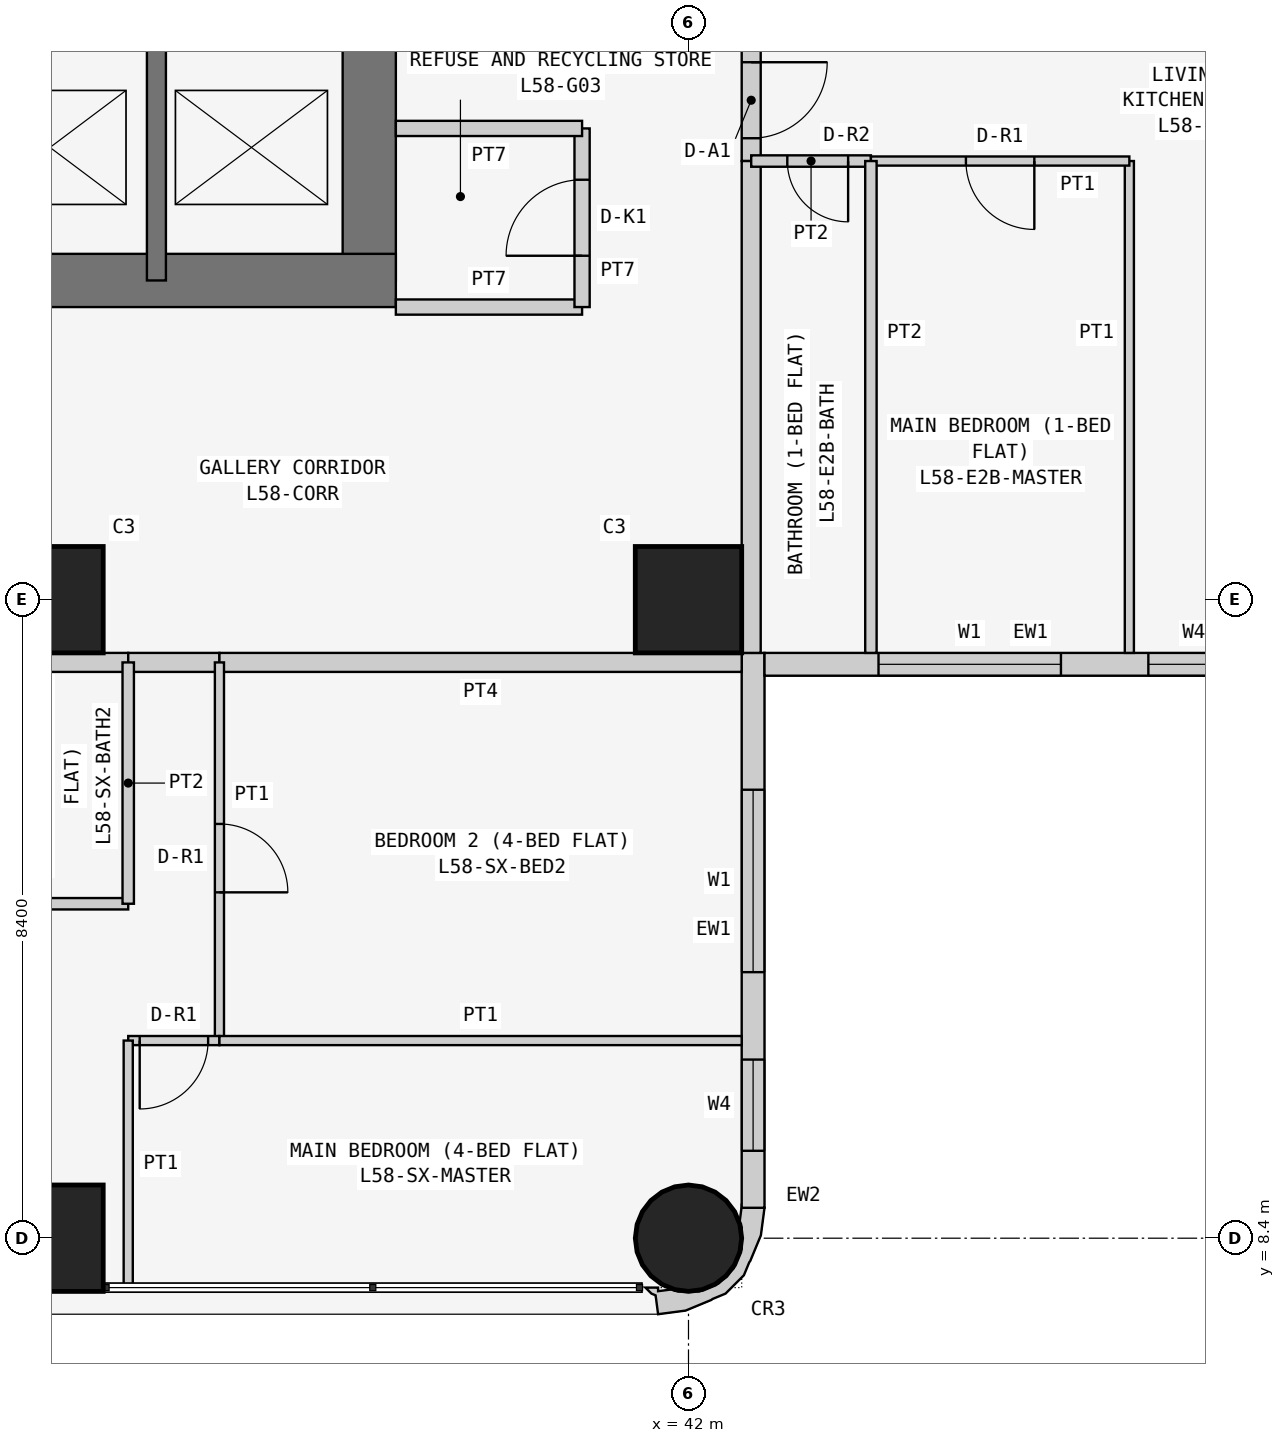
"""IFC4 building model, lengths in metres.
Left out: names, types, materials, properties, quantities, classifications, styles, units other than length and angle.
Written with IfcOpenShell. Run it as: python <this file> out.ifc"""

import sys

from ifc_helpers import new_model, si_unit, direction, frame, frame_2d, origin, origin_2d, place, context, subcontext, project, spatial, polyline, rectangle, circle, outline, extrude, element, fill, save


model = new_model("IFC4")
c1 = context("Model", 3, precision=1e-05, world=origin(), true_north=direction((0.0, 1.0)))
c2 = subcontext(c1, "Body", "Model", "MODEL_VIEW")
j1 = project(units=[si_unit("LENGTHUNIT", "METRE"), si_unit("PLANEANGLEUNIT", "RADIAN")], contexts=[c1])
p1 = place(None, origin())
s1 = spatial("IfcSite", under=j1, at=p1, CompositionType="ELEMENT")
p2 = place(p1, origin())
s2 = spatial("IfcBuilding", under=s1, at=p2, CompositionType="ELEMENT")
p3 = place(p2, frame((0.0, 0.0, 222.9)))
s3 = spatial("IfcBuildingStorey", under=s2, at=p3, CompositionType="ELEMENT", Elevation=222.9)
for number, where, z_axis, x_axis in (
    (1, (33.6, 8.4, 0.0), (0.0, 0.0, 1.0), (1.0, 0.0, 0.0)),
    (2, (33.6, 16.8, 0.0), (0.0, 0.0, 1.0), (1.0, 0.0, 0.0)),
):
    element("IfcColumn", number, at=place(p3, frame(where, z_axis=z_axis, x_axis=x_axis)), inside=s3, PredefinedType="COLUMN", context=c2, shape_type="SweptSolid", body=[
        extrude(rectangle(XDim=1.4, YDim=1.4, at=origin_2d()), origin(), (0.0, 0.0, 1.0), 3.6),
    ])
p4 = place(p3, frame((42.0, 8.4, 0.0), z_axis=(0.0, 0.0, 1.0), x_axis=(1.0, 0.0, 0.0)))
e3 = element("IfcColumn", 3, at=p4, inside=s3, PredefinedType="COLUMN", context=c2, shape_type="SweptSolid", body=[
    extrude(circle(Radius=0.7, at=origin_2d()), origin(), (0.0, 0.0, 1.0), 3.6),
])
p5 = place(p3, frame((42.0, 16.8, 0.0), z_axis=(0.0, 0.0, 1.0), x_axis=(1.0, 0.0, 0.0)))
e4 = element("IfcColumn", 4, at=p5, inside=s3, PredefinedType="COLUMN", context=c2, shape_type="SweptSolid", body=[
    extrude(rectangle(XDim=1.4, YDim=1.4, at=origin_2d()), origin(), (0.0, 0.0, 1.0), 3.6),
])
p6 = place(p3, frame((21.0, 21.0, 0.0), z_axis=(0.0, 0.0, 1.0), x_axis=(1.0, 0.0, 0.0)))
e5 = element("IfcWall", 5, at=p6, inside=s3, PredefinedType="SHEAR", context=c2, shape_type="SweptSolid", body=[
    extrude(rectangle(XDim=17.15, YDim=0.7, at=frame_2d((8.575, 0.0))), origin(), (0.0, 0.0, 1.0), 3.6),
])
p7 = place(p3, frame((37.8, 21.0, 0.0), z_axis=(0.0, 0.0, 1.0), x_axis=(0.0, 1.0, 0.0)))
e6 = element("IfcWall", 6, at=p7, inside=s3, PredefinedType="SHEAR", context=c2, shape_type="SweptSolid", body=[
    extrude(rectangle(XDim=17.15, YDim=0.7, at=frame_2d((8.575, 0.0))), origin(), (0.0, 0.0, 1.0), 3.6),
])
p8 = place(p7, frame((5.2, 0.0, 0.0)))
e7 = element("IfcOpeningElement", 7, at=p8, cuts=e6, PredefinedType="OPENING", context=c2, shape_type="SweptSolid", body=[
    extrude(rectangle(XDim=1.2, YDim=2.1, at=frame_2d((0.6, 1.05))), frame((0.0, 0.36, 0.0), z_axis=(0.0, -1.0, 0.0), x_axis=(1.0, 0.0, 0.0)), (0.0, 0.0, 1.0), 0.72),
])
p9 = place(p3, frame((35.0, 21.0, 0.0), z_axis=(0.0, 0.0, 1.0), x_axis=(0.0, 1.0, 0.0)))
e8 = element("IfcWall", 8, at=p9, inside=s3, PredefinedType="SHEAR", context=c2, shape_type="SweptSolid", body=[
    extrude(rectangle(XDim=3.2, YDim=0.25, at=frame_2d((1.6, 0.0))), origin(), (0.0, 0.0, 1.0), 3.6),
])
p10 = place(p3, frame((42.85, 8.8, 0.0), z_axis=(0.0, 0.0, 1.0), x_axis=(0.0, 1.0, 0.0)))
e9 = element("IfcWall", 9, at=p10, inside=s3, PredefinedType="SOLIDWALL", context=c2, shape_type="SweptSolid", body=[
    extrude(rectangle(XDim=7.3, YDim=0.3, at=frame_2d((3.65, 0.0))), origin(), (0.0, 0.0, 1.0), 3.45),
])
p11 = place(p10, frame((3.1, 0.0, 0.9)))
e10 = element("IfcOpeningElement", 10, at=p11, cuts=e9, PredefinedType="OPENING", context=c2, shape_type="SweptSolid", body=[
    extrude(rectangle(XDim=2.4, YDim=1.5, at=frame_2d((1.2, 0.75))), frame((0.0, 0.16, 0.0), z_axis=(0.0, -1.0, 0.0), x_axis=(1.0, 0.0, 0.0)), (0.0, 0.0, 1.0), 0.32),
])
p12 = place(p10, frame((0.75, 0.0, 0.9)))
e11 = element("IfcOpeningElement", 11, at=p12, cuts=e9, PredefinedType="OPENING", context=c2, shape_type="SweptSolid", body=[
    extrude(rectangle(XDim=1.2, YDim=1.5, at=frame_2d((0.6, 0.75))), frame((0.0, 0.16, 0.0), z_axis=(0.0, -1.0, 0.0), x_axis=(1.0, 0.0, 0.0)), (0.0, 0.0, 1.0), 0.32),
])
p13 = place(p3, frame((43.0, 15.95, 0.0), z_axis=(0.0, 0.0, 1.0), x_axis=(1.0, 0.0, 0.0)))
e12 = element("IfcWall", 12, at=p13, inside=s3, PredefinedType="SOLIDWALL", context=c2, shape_type="SweptSolid", body=[
    extrude(rectangle(XDim=7.0, YDim=0.3, at=frame_2d((3.5, 0.0))), origin(), (0.0, 0.0, 1.0), 3.45),
])
p14 = place(p13, frame((1.5, 0.0, 0.9)))
e13 = element("IfcOpeningElement", 13, at=p14, cuts=e12, PredefinedType="OPENING", context=c2, shape_type="SweptSolid", body=[
    extrude(rectangle(XDim=2.4, YDim=1.5, at=frame_2d((1.2, 0.75))), frame((0.0, 0.16, 0.0), z_axis=(0.0, -1.0, 0.0), x_axis=(1.0, 0.0, 0.0)), (0.0, 0.0, 1.0), 0.32),
])
p15 = place(p13, frame((5.05, 0.0, 0.9)))
e14 = element("IfcOpeningElement", 14, at=p15, cuts=e12, PredefinedType="OPENING", context=c2, shape_type="SweptSolid", body=[
    extrude(rectangle(XDim=1.2, YDim=1.5, at=frame_2d((0.6, 0.75))), frame((0.0, 0.16, 0.0), z_axis=(0.0, -1.0, 0.0), x_axis=(1.0, 0.0, 0.0)), (0.0, 0.0, 1.0), 0.32),
])
p16 = place(p3, frame((41.488, 7.812, 0.0), z_axis=(0.0, 0.0, 1.0), x_axis=(0.439933741929, -0.898030234854, 0.0)))
e15 = element("IfcWall", 15, at=p16, inside=s3, PredefinedType="SOLIDWALL", context=c2, shape_type="SweptSolid", body=[
    extrude(outline(polyline([(-0.222, 1.793), (-0.39, 1.541), (-0.372, 1.532), (-0.195, 1.414), (-0.12, 1.41), (0.131, 1.287), (0.315, 1.078), (0.406, 0.814), (0.388, 0.536), (0.265, 0.285), (0.209, 0.235), (0.148, 0.053), (0.105, 0.074), (0.032, -0.076), (0.138, -0.04), (0.182, -0.0), (0.419, -0.08), (0.536, 0.266), (0.559, 0.631), (0.555, 0.651), (0.566, 0.836), (0.455, 1.159), (0.333, 1.298), (0.324, 1.317), (0.082, 1.591), (-0.222, 1.793)])), origin(), (0.0, 0.0, 1.0), 3.45),
])
p17 = place(p3, frame((38.15, 20.65, 0.0), z_axis=(0.0, 0.0, 1.0), x_axis=(1.0, 0.0, 0.0)))
e16 = element("IfcWall", 16, at=p17, inside=s3, PredefinedType="PARTITIONING", context=c2, shape_type="SweptSolid", body=[
    extrude(rectangle(XDim=2.45, YDim=0.2, at=frame_2d((1.225, 0.0))), origin(), (0.0, 0.0, 1.0), 3.45),
])
p18 = place(p3, frame((40.6, 20.65, 0.0), z_axis=(0.0, 0.0, 1.0), x_axis=(0.0, 1.0, 0.0)))
e17 = element("IfcWall", 17, at=p18, inside=s3, PredefinedType="PARTITIONING", context=c2, shape_type="SweptSolid", body=[
    extrude(rectangle(XDim=2.35, YDim=0.2, at=frame_2d((1.175, 0.0))), origin(), (0.0, 0.0, 1.0), 3.45),
])
p19 = place(p18, frame((0.675, 0.0, 0.0)))
e18 = element("IfcOpeningElement", 18, at=p19, cuts=e17, PredefinedType="OPENING", context=c2, shape_type="SweptSolid", body=[
    extrude(rectangle(XDim=1.0, YDim=2.1, at=frame_2d((0.5, 1.05))), frame((0.0, 0.11, 0.0), z_axis=(0.0, -1.0, 0.0), x_axis=(1.0, 0.0, 0.0)), (0.0, 0.0, 1.0), 0.22),
])
p20 = place(p3, frame((40.6, 23.0, 0.0), z_axis=(0.0, 0.0, 1.0), x_axis=(-1.0, 0.0, 0.0)))
e19 = element("IfcWall", 19, at=p20, inside=s3, PredefinedType="PARTITIONING", context=c2, shape_type="SweptSolid", body=[
    extrude(rectangle(XDim=2.45, YDim=0.2, at=frame_2d((1.225, 0.0))), origin(), (0.0, 0.0, 1.0), 3.45),
])
p21 = place(p3, frame((42.825, 24.171, 0.0), z_axis=(0.0, 0.0, 1.0), x_axis=(0.0, -1.0, 0.0)))
e20 = element("IfcWall", 20, at=p21, inside=s3, PredefinedType="PARTITIONING", context=c2, shape_type="SweptSolid", body=[
    extrude(rectangle(XDim=1.6, YDim=0.25, at=frame_2d((0.8, 0.0))), origin(), (0.0, 0.0, 1.0), 3.45),
])
p22 = place(p21, frame((0.3, 0.0, 0.0)))
e21 = element("IfcOpeningElement", 21, at=p22, cuts=e20, PredefinedType="OPENING", context=c2, shape_type="SweptSolid", body=[
    extrude(rectangle(XDim=1.0, YDim=2.1, at=frame_2d((0.5, 1.05))), frame((0.0, 0.135, 0.0), z_axis=(0.0, -1.0, 0.0), x_axis=(1.0, 0.0, 0.0)), (0.0, 0.0, 1.0), 0.27),
])
p23 = place(p3, frame((42.825, 22.571, 0.0), z_axis=(0.0, 0.0, 1.0), x_axis=(0.0, -1.0, 0.0)))
e22 = element("IfcWall", 22, at=p23, inside=s3, PredefinedType="PARTITIONING", context=c2, shape_type="SweptSolid", body=[
    extrude(rectangle(XDim=6.471, YDim=0.25, at=frame_2d((3.235, 0.0))), origin(), (0.0, 0.0, 1.0), 3.45),
])
p24 = place(p3, frame((34.629, 15.975, 0.0), z_axis=(0.0, 0.0, 1.0), x_axis=(-1.0, 0.0, 0.0)))
e23 = element("IfcWall", 23, at=p24, inside=s3, PredefinedType="PARTITIONING", context=c2, shape_type="SweptSolid", body=[
    extrude(rectangle(XDim=2.629, YDim=0.25, at=frame_2d((1.314, 0.0))), origin(), (0.0, 0.0, 1.0), 3.45),
])
p25 = place(p3, frame((35.829, 15.975, 0.0), z_axis=(0.0, 0.0, 1.0), x_axis=(-1.0, 0.0, 0.0)))
e24 = element("IfcWall", 24, at=p25, inside=s3, PredefinedType="PARTITIONING", context=c2, shape_type="SweptSolid", body=[
    extrude(rectangle(XDim=1.2, YDim=0.25, at=frame_2d((0.6, 0.0))), origin(), (0.0, 0.0, 1.0), 3.45),
])
p26 = place(p3, frame((42.7, 15.975, 0.0), z_axis=(0.0, 0.0, 1.0), x_axis=(-1.0, 0.0, 0.0)))
e25 = element("IfcWall", 25, at=p26, inside=s3, PredefinedType="PARTITIONING", context=c2, shape_type="SweptSolid", body=[
    extrude(rectangle(XDim=6.871, YDim=0.25, at=frame_2d((3.436, 0.0))), origin(), (0.0, 0.0, 1.0), 3.45),
])
p27 = place(p3, frame((44.4, 22.571, 0.0), z_axis=(0.0, 0.0, 1.0), x_axis=(-1.0, 0.0, 0.0)))
e26 = element("IfcWall", 26, at=p27, inside=s3, PredefinedType="PARTITIONING", context=c2, shape_type="SweptSolid", body=[
    extrude(rectangle(XDim=1.575, YDim=0.15, at=frame_2d((0.788, 0.0))), origin(), (0.0, 0.0, 1.0), 3.45),
])
p28 = place(p27, frame((0.3, 0.0, 0.0)))
e27 = element("IfcOpeningElement", 27, at=p28, cuts=e26, PredefinedType="OPENING", context=c2, shape_type="SweptSolid", body=[
    extrude(rectangle(XDim=0.8, YDim=2.1, at=frame_2d((0.4, 1.05))), frame((0.0, 0.085, 0.0), z_axis=(0.0, -1.0, 0.0), x_axis=(1.0, 0.0, 0.0)), (0.0, 0.0, 1.0), 0.17),
])
p29 = place(p3, frame((47.8, 16.1, 0.0), z_axis=(0.0, 0.0, 1.0), x_axis=(0.0, 1.0, 0.0)))
e28 = element("IfcWall", 28, at=p29, inside=s3, PredefinedType="PARTITIONING", context=c2, shape_type="SweptSolid", body=[
    extrude(rectangle(XDim=6.471, YDim=0.12, at=frame_2d((3.235, 0.0))), origin(), (0.0, 0.0, 1.0), 3.45),
])
p30 = place(p3, frame((47.8, 22.571, 0.0), z_axis=(0.0, 0.0, 1.0), x_axis=(-1.0, 0.0, 0.0)))
e29 = element("IfcWall", 29, at=p30, inside=s3, PredefinedType="PARTITIONING", context=c2, shape_type="SweptSolid", body=[
    extrude(rectangle(XDim=3.4, YDim=0.12, at=frame_2d((1.7, 0.0))), origin(), (0.0, 0.0, 1.0), 3.45),
])
p31 = place(p30, frame((1.25, 0.0, 0.0)))
e30 = element("IfcOpeningElement", 30, at=p31, cuts=e29, PredefinedType="OPENING", context=c2, shape_type="SweptSolid", body=[
    extrude(rectangle(XDim=0.9, YDim=2.1, at=frame_2d((0.45, 1.05))), frame((0.0, 0.07, 0.0), z_axis=(0.0, -1.0, 0.0), x_axis=(1.0, 0.0, 0.0)), (0.0, 0.0, 1.0), 0.14),
])
p32 = place(p3, frame((44.4, 22.571, 0.0), z_axis=(0.0, 0.0, 1.0), x_axis=(0.0, -1.0, 0.0)))
e31 = element("IfcWall", 31, at=p32, inside=s3, PredefinedType="PARTITIONING", context=c2, shape_type="SweptSolid", body=[
    extrude(rectangle(XDim=6.471, YDim=0.15, at=frame_2d((3.235, 0.0))), origin(), (0.0, 0.0, 1.0), 3.45),
])
p33 = place(p3, frame((32.0, 12.8, 0.0), z_axis=(0.0, 0.0, 1.0), x_axis=(1.0, 0.0, 0.0)))
e32 = element("IfcWall", 32, at=p33, inside=s3, PredefinedType="PARTITIONING", context=c2, shape_type="SweptSolid", body=[
    extrude(rectangle(XDim=2.629, YDim=0.15, at=frame_2d((1.314, 0.0))), origin(), (0.0, 0.0, 1.0), 3.45),
])
p34 = place(p3, frame((34.629, 12.8, 0.0), z_axis=(0.0, 0.0, 1.0), x_axis=(0.0, 1.0, 0.0)))
e33 = element("IfcWall", 33, at=p34, inside=s3, PredefinedType="PARTITIONING", context=c2, shape_type="SweptSolid", body=[
    extrude(rectangle(XDim=3.175, YDim=0.15, at=frame_2d((1.587, 0.0))), origin(), (0.0, 0.0, 1.0), 3.45),
])
p35 = place(p3, frame((35.829, 15.975, 0.0), z_axis=(0.0, 0.0, 1.0), x_axis=(0.0, -1.0, 0.0)))
e34 = element("IfcWall", 34, at=p35, inside=s3, PredefinedType="PARTITIONING", context=c2, shape_type="SweptSolid", body=[
    extrude(rectangle(XDim=4.975, YDim=0.12, at=frame_2d((2.488, 0.0))), origin(), (0.0, 0.0, 1.0), 3.45),
])
p36 = place(p35, frame((2.125, 0.0, 0.0)))
e35 = element("IfcOpeningElement", 35, at=p36, cuts=e34, PredefinedType="OPENING", context=c2, shape_type="SweptSolid", body=[
    extrude(rectangle(XDim=0.9, YDim=2.1, at=frame_2d((0.45, 1.05))), frame((0.0, 0.07, 0.0), z_axis=(0.0, -1.0, 0.0), x_axis=(1.0, 0.0, 0.0)), (0.0, 0.0, 1.0), 0.14),
])
p37 = place(p3, frame((35.829, 11.0, 0.0), z_axis=(0.0, 0.0, 1.0), x_axis=(-1.0, 0.0, 0.0)))
e36 = element("IfcWall", 36, at=p37, inside=s3, PredefinedType="PARTITIONING", context=c2, shape_type="SweptSolid", body=[
    extrude(rectangle(XDim=1.2, YDim=0.12, at=frame_2d((0.6, 0.0))), origin(), (0.0, 0.0, 1.0), 3.45),
])
p38 = place(p37, frame((0.149, 0.0, 0.0)))
e37 = element("IfcOpeningElement", 37, at=p38, cuts=e36, PredefinedType="OPENING", context=c2, shape_type="SweptSolid", body=[
    extrude(rectangle(XDim=0.9, YDim=2.1, at=frame_2d((0.45, 1.05))), frame((0.0, 0.07, 0.0), z_axis=(0.0, -1.0, 0.0), x_axis=(1.0, 0.0, 0.0)), (0.0, 0.0, 1.0), 0.14),
])
p39 = place(p3, frame((34.629, 11.0, 0.0), z_axis=(0.0, 0.0, 1.0), x_axis=(0.0, -1.0, 0.0)))
e38 = element("IfcWall", 38, at=p39, inside=s3, PredefinedType="PARTITIONING", context=c2, shape_type="SweptSolid", body=[
    extrude(rectangle(XDim=3.25, YDim=0.12, at=frame_2d((1.625, 0.0))), origin(), (0.0, 0.0, 1.0), 3.45),
])
p40 = place(p3, frame((35.829, 11.0, 0.0), z_axis=(0.0, 0.0, 1.0), x_axis=(1.0, 0.0, 0.0)))
e39 = element("IfcWall", 39, at=p40, inside=s3, PredefinedType="PARTITIONING", context=c2, shape_type="SweptSolid", body=[
    extrude(rectangle(XDim=6.871, YDim=0.12, at=frame_2d((3.436, 0.0))), origin(), (0.0, 0.0, 1.0), 3.45),
])
p41 = place(p14, origin())
e40 = element("IfcWindow", 40, at=p41, inside=s3, PartitioningType="SINGLE_PANEL", PredefinedType="WINDOW", context=c2, shape_type="SweptSolid", body=[
    extrude(rectangle(XDim=2.4, YDim=1.5, at=frame_2d((1.2, 0.75))), frame((0.0, 0.03, 0.0), z_axis=(0.0, -1.0, 0.0), x_axis=(1.0, 0.0, 0.0)), (0.0, 0.0, 1.0), 0.06),
])
fill(e13, e40)
p42 = place(p15, origin())
e41 = element("IfcWindow", 41, at=p42, inside=s3, PartitioningType="SINGLE_PANEL", PredefinedType="WINDOW", context=c2, shape_type="SweptSolid", body=[
    extrude(rectangle(XDim=1.2, YDim=1.5, at=frame_2d((0.6, 0.75))), frame((0.0, 0.03, 0.0), z_axis=(0.0, -1.0, 0.0), x_axis=(1.0, 0.0, 0.0)), (0.0, 0.0, 1.0), 0.06),
])
fill(e14, e41)
p43 = place(p11, origin())
e42 = element("IfcWindow", 42, at=p43, inside=s3, PartitioningType="SINGLE_PANEL", PredefinedType="WINDOW", context=c2, shape_type="SweptSolid", body=[
    extrude(rectangle(XDim=2.4, YDim=1.5, at=frame_2d((1.2, 0.75))), frame((0.0, 0.03, 0.0), z_axis=(0.0, -1.0, 0.0), x_axis=(1.0, 0.0, 0.0)), (0.0, 0.0, 1.0), 0.06),
])
fill(e10, e42)
p44 = place(p12, origin())
e43 = element("IfcWindow", 43, at=p44, inside=s3, PartitioningType="SINGLE_PANEL", PredefinedType="WINDOW", context=c2, shape_type="SweptSolid", body=[
    extrude(rectangle(XDim=1.2, YDim=1.5, at=frame_2d((0.6, 0.75))), frame((0.0, 0.03, 0.0), z_axis=(0.0, -1.0, 0.0), x_axis=(1.0, 0.0, 0.0)), (0.0, 0.0, 1.0), 0.06),
])
fill(e11, e43)
p45 = place(p19, origin())
e44 = element("IfcDoor", 44, at=p45, inside=s3, OperationType="SINGLE_SWING_LEFT", PredefinedType="DOOR", context=c2, shape_type="SweptSolid", body=[
    extrude(rectangle(XDim=1.0, YDim=2.1, at=frame_2d((0.5, 1.05))), frame((0.0, 0.025, 0.0), z_axis=(0.0, -1.0, 0.0), x_axis=(1.0, 0.0, 0.0)), (0.0, 0.0, 1.0), 0.05),
])
fill(e18, e44)
p46 = place(p22, origin())
e45 = element("IfcDoor", 45, at=p46, inside=s3, OperationType="SINGLE_SWING_LEFT", PredefinedType="DOOR", context=c2, shape_type="SweptSolid", body=[
    extrude(rectangle(XDim=1.0, YDim=2.1, at=frame_2d((0.5, 1.05))), frame((0.0, 0.025, 0.0), z_axis=(0.0, -1.0, 0.0), x_axis=(1.0, 0.0, 0.0)), (0.0, 0.0, 1.0), 0.05),
])
fill(e21, e45)
p47 = place(p28, origin())
e46 = element("IfcDoor", 46, at=p47, inside=s3, OperationType="SINGLE_SWING_LEFT", PredefinedType="DOOR", context=c2, shape_type="SweptSolid", body=[
    extrude(rectangle(XDim=0.8, YDim=2.1, at=frame_2d((0.4, 1.05))), frame((0.0, 0.025, 0.0), z_axis=(0.0, -1.0, 0.0), x_axis=(1.0, 0.0, 0.0)), (0.0, 0.0, 1.0), 0.05),
])
fill(e27, e46)
p48 = place(p31, origin())
e47 = element("IfcDoor", 47, at=p48, inside=s3, OperationType="SINGLE_SWING_LEFT", PredefinedType="DOOR", context=c2, shape_type="SweptSolid", body=[
    extrude(rectangle(XDim=0.9, YDim=2.1, at=frame_2d((0.45, 1.05))), frame((0.0, 0.025, 0.0), z_axis=(0.0, -1.0, 0.0), x_axis=(1.0, 0.0, 0.0)), (0.0, 0.0, 1.0), 0.05),
])
fill(e30, e47)
p49 = place(p36, origin())
e48 = element("IfcDoor", 48, at=p49, inside=s3, OperationType="SINGLE_SWING_RIGHT", PredefinedType="DOOR", context=c2, shape_type="SweptSolid", body=[
    extrude(rectangle(XDim=0.9, YDim=2.1, at=frame_2d((0.45, 1.05))), frame((0.0, 0.025, 0.0), z_axis=(0.0, -1.0, 0.0), x_axis=(1.0, 0.0, 0.0)), (0.0, 0.0, 1.0), 0.05),
])
fill(e35, e48)
p50 = place(p38, origin())
e49 = element("IfcDoor", 49, at=p50, inside=s3, OperationType="SINGLE_SWING_RIGHT", PredefinedType="DOOR", context=c2, shape_type="SweptSolid", body=[
    extrude(rectangle(XDim=0.9, YDim=2.1, at=frame_2d((0.45, 1.05))), frame((0.0, 0.025, 0.0), z_axis=(0.0, -1.0, 0.0), x_axis=(1.0, 0.0, 0.0)), (0.0, 0.0, 1.0), 0.05),
])
fill(e37, e49)
save(model, sys.argv[1])
